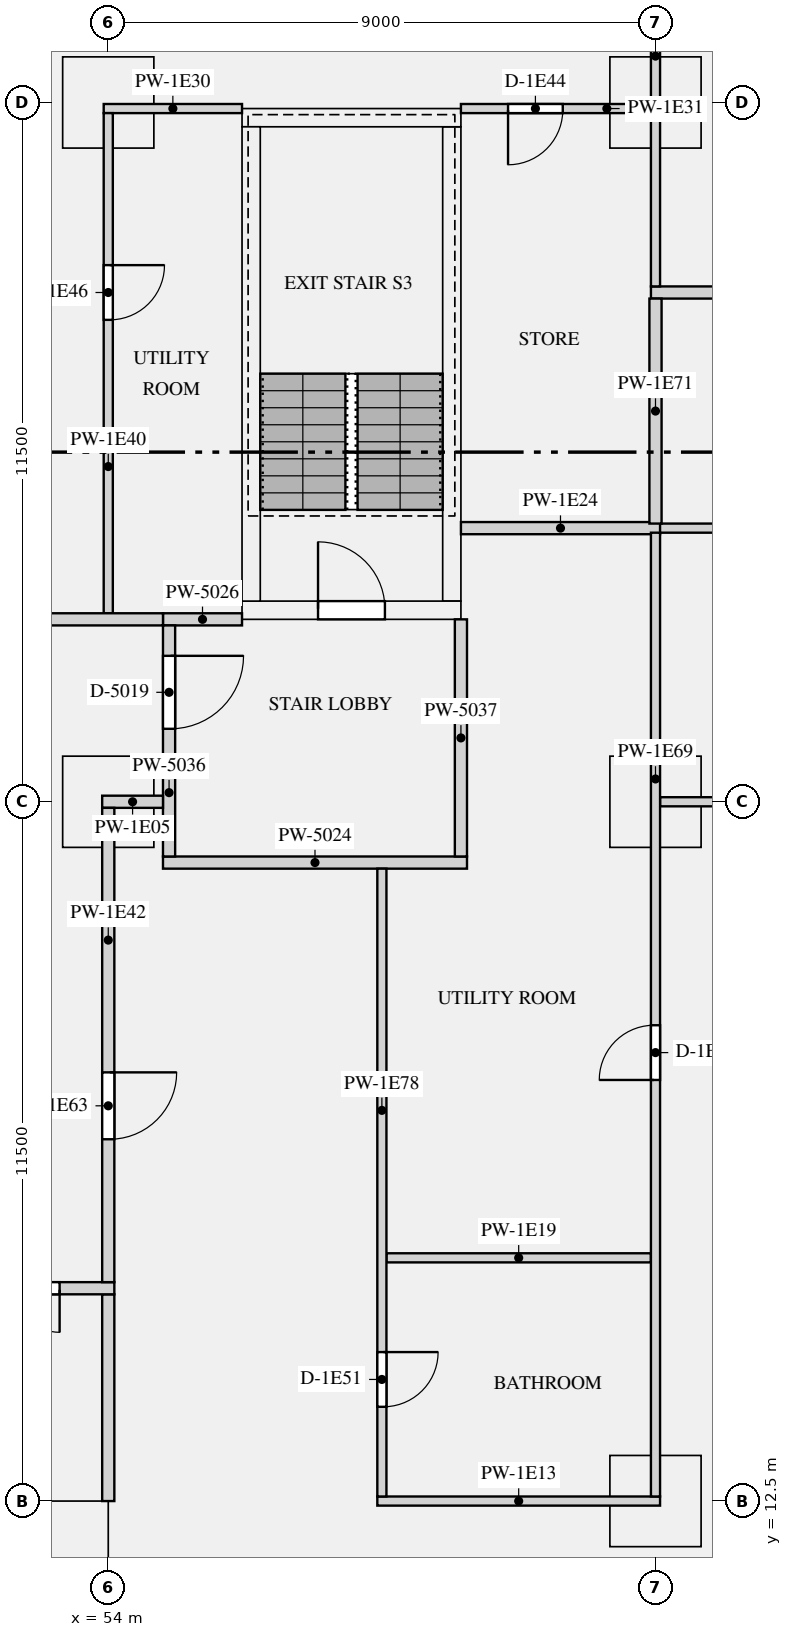
"""IFC4 building model, lengths in metres.
Left out: names, types, materials, properties, quantities, classifications, styles, units other than length and angle.
Written with IfcOpenShell. Run it as: python <this file> out.ifc"""

import sys

from ifc_helpers import new_model, si_unit, direction, frame, frame_2d, origin, origin_2d, place, context, subcontext, project, spatial, rectangle, extrude, element, fill, save


model = new_model("IFC4")
c1 = context("Model", 3, precision=1e-05, world=origin(), true_north=direction((0.0, 1.0)))
c2 = subcontext(c1, "Body", "Model", "MODEL_VIEW")
j1 = project(units=[si_unit("LENGTHUNIT", "METRE"), si_unit("PLANEANGLEUNIT", "RADIAN")], contexts=[c1])
p1 = place(None, origin())
s1 = spatial("IfcSite", under=j1, at=p1, CompositionType="ELEMENT")
p2 = place(p1, origin())
s2 = spatial("IfcBuilding", under=s1, at=p2, CompositionType="ELEMENT")
p3 = place(p2, frame((0.0, 0.0, 54.15)))
s3 = spatial("IfcBuildingStorey", under=s2, at=p3, CompositionType="ELEMENT", Elevation=54.15)
for number, where, z_axis, x_axis in (
    (1, (54.0, 24.0, 0.0), (0.0, 0.0, 1.0), (1.0, 0.0, 0.0)),
    (2, (63.0, 24.0, 0.0), (0.0, 0.0, 1.0), (1.0, 0.0, 0.0)),
    (3, (54.0, 35.5, 0.0), (0.0, 0.0, 1.0), (1.0, 0.0, 0.0)),
    (4, (63.0, 35.5, 0.0), (0.0, 0.0, 1.0), (1.0, 0.0, 0.0)),
    (5, (63.0, 12.5, 0.0), (0.0, 0.0, 1.0), (1.0, 0.0, 0.0)),
):
    element("IfcColumn", number, at=place(p3, frame(where, z_axis=z_axis, x_axis=x_axis)), inside=s3, PredefinedType="COLUMN", context=c2, shape_type="SweptSolid", body=[
        extrude(rectangle(XDim=1.5, YDim=1.5, at=origin_2d()), origin(), (0.0, 0.0, 1.0), 3.15),
    ])
p4 = place(p3, frame((53.5, 0.0, 0.0), z_axis=(0.0, 0.0, 1.0), x_axis=(0.0, 1.0, 0.0)))
e6 = element("IfcWall", 6, at=p4, inside=s3, PredefinedType="SHEAR", context=c2, shape_type="SweptSolid", body=[
    extrude(rectangle(XDim=12.5, YDim=1.0, at=frame_2d((6.25, 0.0))), origin(), (0.0, 0.0, 1.0), 3.15),
])
p5 = place(p3, frame((56.2, 27.15, 0.0), z_axis=(0.0, 0.0, 1.0), x_axis=(1.0, 0.0, 0.0)))
e7 = element("IfcWall", 7, at=p5, inside=s3, PredefinedType="SHEAR", context=c2, shape_type="SweptSolid", body=[
    extrude(rectangle(XDim=3.6, YDim=0.3, at=frame_2d((1.8, 0.0))), origin(), (0.0, 0.0, 1.0), 3.15),
])
p6 = place(p5, frame((1.25, 0.0, 0.0)))
e8 = element("IfcOpeningElement", 8, at=p6, cuts=e7, PredefinedType="OPENING", context=c2, shape_type="SweptSolid", body=[
    extrude(rectangle(XDim=1.1, YDim=2.1, at=frame_2d((0.55, 1.05))), frame((0.0, 0.16, 0.0), z_axis=(0.0, -1.0, 0.0), x_axis=(1.0, 0.0, 0.0)), (0.0, 0.0, 1.0), 0.32),
])
p7 = place(p3, frame((56.2, 35.25, 0.0), z_axis=(0.0, 0.0, 1.0), x_axis=(1.0, 0.0, 0.0)))
e9 = element("IfcWall", 9, at=p7, inside=s3, PredefinedType="SHEAR", context=c2, shape_type="SweptSolid", body=[
    extrude(rectangle(XDim=3.6, YDim=0.3, at=frame_2d((1.8, 0.0))), origin(), (0.0, 0.0, 1.0), 3.15),
])
for number, where, z_axis, x_axis in (
    (10, (56.35, 27.3, 0.0), (0.0, 0.0, 1.0), (0.0, 1.0, 0.0)),
    (11, (59.65, 27.3, 0.0), (0.0, 0.0, 1.0), (0.0, 1.0, 0.0)),
):
    element("IfcWall", number, at=place(p3, frame(where, z_axis=z_axis, x_axis=x_axis)), inside=s3, PredefinedType="SHEAR", context=c2, shape_type="SweptSolid", body=[
        extrude(rectangle(XDim=7.8, YDim=0.3, at=frame_2d((3.9, 0.0))), origin(), (0.0, 0.0, 1.0), 3.15),
    ])
p8 = place(p3, frame((54.9, 23.0, 0.0), z_axis=(0.0, 0.0, 1.0), x_axis=(1.0, 0.0, 0.0)))
e12 = element("IfcWall", 12, at=p8, inside=s3, PredefinedType="PARTITIONING", context=c2, shape_type="SweptSolid", body=[
    extrude(rectangle(XDim=5.0, YDim=0.2, at=frame_2d((2.5, 0.0))), origin(), (0.0, 0.0, 1.0), 2.83),
])
p9 = place(p3, frame((54.9, 27.0, 0.0), z_axis=(0.0, 0.0, 1.0), x_axis=(1.0, 0.0, 0.0)))
e13 = element("IfcWall", 13, at=p9, inside=s3, PredefinedType="PARTITIONING", context=c2, shape_type="SweptSolid", body=[
    extrude(rectangle(XDim=1.3, YDim=0.2, at=frame_2d((0.65, 0.0))), origin(), (0.0, 0.0, 1.0), 2.83),
])
p10 = place(p3, frame((54.0, 12.5, 0.0), z_axis=(0.0, 0.0, 1.0), x_axis=(0.0, 1.0, 0.0)))
e14 = element("IfcWall", 14, at=p10, inside=s3, PredefinedType="PARTITIONING", context=c2, shape_type="SweptSolid", body=[
    extrude(rectangle(XDim=3.4, YDim=0.2, at=frame_2d((1.7, 0.0))), origin(), (0.0, 0.0, 1.0), 2.83),
])
p11 = place(p3, frame((55.0, 23.1, 0.0), z_axis=(0.0, 0.0, 1.0), x_axis=(0.0, 1.0, 0.0)))
e15 = element("IfcWall", 15, at=p11, inside=s3, PredefinedType="PARTITIONING", context=c2, shape_type="SweptSolid", body=[
    extrude(rectangle(XDim=3.8, YDim=0.2, at=frame_2d((1.9, 0.0))), origin(), (0.0, 0.0, 1.0), 2.83),
])
p12 = place(p11, frame((2.1, 0.0, 0.0)))
e16 = element("IfcOpeningElement", 16, at=p12, cuts=e15, PredefinedType="OPENING", context=c2, shape_type="SweptSolid", body=[
    extrude(rectangle(XDim=1.2, YDim=2.1, at=frame_2d((0.6, 1.05))), frame((0.0, 0.11, 0.0), z_axis=(0.0, -1.0, 0.0), x_axis=(1.0, 0.0, 0.0)), (0.0, 0.0, 1.0), 0.22),
])
p13 = place(p3, frame((59.8, 23.1, 0.0), z_axis=(0.0, 0.0, 1.0), x_axis=(0.0, 1.0, 0.0)))
e17 = element("IfcWall", 17, at=p13, inside=s3, PredefinedType="PARTITIONING", context=c2, shape_type="SweptSolid", body=[
    extrude(rectangle(XDim=3.9, YDim=0.2, at=frame_2d((1.95, 0.0))), origin(), (0.0, 0.0, 1.0), 2.83),
])
p14 = place(p3, frame((63.075, 24.0, 0.0), z_axis=(0.0, 0.0, 1.0), x_axis=(1.0, 0.0, 0.0)))
e18 = element("IfcWall", 18, at=p14, inside=s3, PredefinedType="PARTITIONING", context=c2, shape_type="SweptSolid", body=[
    extrude(rectangle(XDim=10.125, YDim=0.15, at=frame_2d((5.062, 0.0))), origin(), (0.0, 0.0, 1.0), 2.83),
])
p15 = place(p14, frame((2.1, 0.0, 0.0)))
e19 = element("IfcOpeningElement", 19, at=p15, cuts=e18, PredefinedType="OPENING", context=c2, shape_type="SweptSolid", body=[
    extrude(rectangle(XDim=0.9, YDim=2.1, at=frame_2d((0.45, 1.05))), frame((0.0, 0.085, 0.0), z_axis=(0.0, -1.0, 0.0), x_axis=(1.0, 0.0, 0.0)), (0.0, 0.0, 1.0), 0.17),
])
p16 = place(p3, frame((53.9, 24.0, 0.0), z_axis=(0.0, 0.0, 1.0), x_axis=(1.0, 0.0, 0.0)))
e20 = element("IfcWall", 20, at=p16, inside=s3, PredefinedType="PARTITIONING", context=c2, shape_type="SweptSolid", body=[
    extrude(rectangle(XDim=1.0, YDim=0.2, at=frame_2d((0.5, 0.0))), origin(), (0.0, 0.0, 1.0), 2.83),
])
p17 = place(p3, frame((47.9, 27.0, 0.0), z_axis=(0.0, 0.0, 1.0), x_axis=(1.0, 0.0, 0.0)))
e21 = element("IfcWall", 21, at=p17, inside=s3, PredefinedType="PARTITIONING", context=c2, shape_type="SweptSolid", body=[
    extrude(rectangle(XDim=7.0, YDim=0.2, at=frame_2d((3.5, 0.0))), origin(), (0.0, 0.0, 1.0), 2.83),
])
p18 = place(p3, frame((58.425, 12.5, 0.0), z_axis=(0.0, 0.0, 1.0), x_axis=(1.0, 0.0, 0.0)))
e22 = element("IfcWall", 22, at=p18, inside=s3, PredefinedType="PARTITIONING", context=c2, shape_type="SweptSolid", body=[
    extrude(rectangle(XDim=4.65, YDim=0.15, at=frame_2d((2.325, 0.0))), origin(), (0.0, 0.0, 1.0), 2.83),
])
p19 = place(p3, frame((58.575, 16.5, 0.0), z_axis=(0.0, 0.0, 1.0), x_axis=(1.0, 0.0, 0.0)))
e23 = element("IfcWall", 23, at=p19, inside=s3, PredefinedType="PARTITIONING", context=c2, shape_type="SweptSolid", body=[
    extrude(rectangle(XDim=4.35, YDim=0.15, at=frame_2d((2.175, 0.0))), origin(), (0.0, 0.0, 1.0), 2.83),
])
p20 = place(p3, frame((62.925, 32.375, 0.0), z_axis=(0.0, 0.0, 1.0), x_axis=(1.0, 0.0, 0.0)))
e24 = element("IfcWall", 24, at=p20, inside=s3, PredefinedType="PARTITIONING", context=c2, shape_type="SweptSolid", body=[
    extrude(rectangle(XDim=12.775, YDim=0.2, at=frame_2d((6.387, 0.0))), origin(), (0.0, 0.0, 1.0), 2.83),
])
p21 = place(p3, frame((62.925, 28.5, 0.0), z_axis=(0.0, 0.0, 1.0), x_axis=(1.0, 0.0, 0.0)))
e25 = element("IfcWall", 25, at=p21, inside=s3, PredefinedType="PARTITIONING", context=c2, shape_type="SweptSolid", body=[
    extrude(rectangle(XDim=10.275, YDim=0.15, at=frame_2d((5.137, 0.0))), origin(), (0.0, 0.0, 1.0), 2.83),
])
p22 = place(p21, frame((4.5, 0.0, 0.0)))
e26 = element("IfcOpeningElement", 26, at=p22, cuts=e25, PredefinedType="OPENING", context=c2, shape_type="SweptSolid", body=[
    extrude(rectangle(XDim=1.5, YDim=2.1, at=frame_2d((0.75, 1.05))), frame((0.0, 0.085, 0.0), z_axis=(0.0, -1.0, 0.0), x_axis=(1.0, 0.0, 0.0)), (0.0, 0.0, 1.0), 0.17),
])
p23 = place(p3, frame((59.8, 28.5, 0.0), z_axis=(0.0, 0.0, 1.0), x_axis=(1.0, 0.0, 0.0)))
e27 = element("IfcWall", 27, at=p23, inside=s3, PredefinedType="PARTITIONING", context=c2, shape_type="SweptSolid", body=[
    extrude(rectangle(XDim=3.275, YDim=0.2, at=frame_2d((1.637, 0.0))), origin(), (0.0, 0.0, 1.0), 2.83),
])
p24 = place(p3, frame((53.925, 35.4, 0.0), z_axis=(0.0, 0.0, 1.0), x_axis=(1.0, 0.0, 0.0)))
e28 = element("IfcWall", 28, at=p24, inside=s3, PredefinedType="PARTITIONING", context=c2, shape_type="SweptSolid", body=[
    extrude(rectangle(XDim=2.275, YDim=0.15, at=frame_2d((1.137, 0.0))), origin(), (0.0, 0.0, 1.0), 2.83),
])
p25 = place(p3, frame((59.8, 35.4, 0.0), z_axis=(0.0, 0.0, 1.0), x_axis=(1.0, 0.0, 0.0)))
e29 = element("IfcWall", 29, at=p25, inside=s3, PredefinedType="PARTITIONING", context=c2, shape_type="SweptSolid", body=[
    extrude(rectangle(XDim=3.125, YDim=0.15, at=frame_2d((1.562, 0.0))), origin(), (0.0, 0.0, 1.0), 2.83),
])
p26 = place(p25, frame((0.775, 0.0, 0.0)))
e30 = element("IfcOpeningElement", 30, at=p26, cuts=e29, PredefinedType="OPENING", context=c2, shape_type="SweptSolid", body=[
    extrude(rectangle(XDim=0.9, YDim=2.1, at=frame_2d((0.45, 1.05))), frame((0.0, 0.085, 0.0), z_axis=(0.0, -1.0, 0.0), x_axis=(1.0, 0.0, 0.0)), (0.0, 0.0, 1.0), 0.17),
])
p27 = place(p3, frame((17.9, 16.0, 0.0), z_axis=(0.0, 0.0, 1.0), x_axis=(1.0, 0.0, 0.0)))
e31 = element("IfcWall", 31, at=p27, inside=s3, PredefinedType="PARTITIONING", context=c2, shape_type="SweptSolid", body=[
    extrude(rectangle(XDim=36.2, YDim=0.2, at=frame_2d((18.1, 0.0))), origin(), (0.0, 0.0, 1.0), 2.83),
])
p28 = place(p27, frame((0.9, 0.0, 0.0)))
e32 = element("IfcOpeningElement", 32, at=p28, cuts=e31, PredefinedType="OPENING", context=c2, shape_type="SweptSolid", body=[
    extrude(rectangle(XDim=1.4, YDim=2.1, at=frame_2d((0.7, 1.05))), frame((0.0, 0.11, 0.0), z_axis=(0.0, -1.0, 0.0), x_axis=(1.0, 0.0, 0.0)), (0.0, 0.0, 1.0), 0.22),
])
p29 = place(p27, frame((33.9, 0.0, 0.0)))
e33 = element("IfcOpeningElement", 33, at=p29, cuts=e31, PredefinedType="OPENING", context=c2, shape_type="SweptSolid", body=[
    extrude(rectangle(XDim=1.4, YDim=2.1, at=frame_2d((0.7, 1.05))), frame((0.0, 0.11, 0.0), z_axis=(0.0, -1.0, 0.0), x_axis=(1.0, 0.0, 0.0)), (0.0, 0.0, 1.0), 0.22),
])
p30 = place(p3, frame((54.0, 27.1, 0.0), z_axis=(0.0, 0.0, 1.0), x_axis=(0.0, 1.0, 0.0)))
e34 = element("IfcWall", 34, at=p30, inside=s3, PredefinedType="PARTITIONING", context=c2, shape_type="SweptSolid", body=[
    extrude(rectangle(XDim=8.225, YDim=0.15, at=frame_2d((4.112, 0.0))), origin(), (0.0, 0.0, 1.0), 2.83),
])
p31 = place(p30, frame((4.825, 0.0, 0.0)))
e35 = element("IfcOpeningElement", 35, at=p31, cuts=e34, PredefinedType="OPENING", context=c2, shape_type="SweptSolid", body=[
    extrude(rectangle(XDim=0.9, YDim=2.1, at=frame_2d((0.45, 1.05))), frame((0.0, 0.085, 0.0), z_axis=(0.0, -1.0, 0.0), x_axis=(1.0, 0.0, 0.0)), (0.0, 0.0, 1.0), 0.17),
])
p32 = place(p3, frame((54.0, 16.1, 0.0), z_axis=(0.0, 0.0, 1.0), x_axis=(0.0, 1.0, 0.0)))
e36 = element("IfcWall", 36, at=p32, inside=s3, PredefinedType="PARTITIONING", context=c2, shape_type="SweptSolid", body=[
    extrude(rectangle(XDim=7.8, YDim=0.2, at=frame_2d((3.9, 0.0))), origin(), (0.0, 0.0, 1.0), 2.83),
])
p33 = place(p32, frame((2.35, 0.0, 0.0)))
e37 = element("IfcOpeningElement", 37, at=p33, cuts=e36, PredefinedType="OPENING", context=c2, shape_type="SweptSolid", body=[
    extrude(rectangle(XDim=1.1, YDim=2.1, at=frame_2d((0.55, 1.05))), frame((0.0, 0.11, 0.0), z_axis=(0.0, -1.0, 0.0), x_axis=(1.0, 0.0, 0.0)), (0.0, 0.0, 1.0), 0.22),
])
p34 = place(p3, frame((63.0, 12.575, 0.0), z_axis=(0.0, 0.0, 1.0), x_axis=(0.0, 1.0, 0.0)))
e38 = element("IfcWall", 38, at=p34, inside=s3, PredefinedType="PARTITIONING", context=c2, shape_type="SweptSolid", body=[
    extrude(rectangle(XDim=15.85, YDim=0.15, at=frame_2d((7.925, 0.0))), origin(), (0.0, 0.0, 1.0), 2.83),
])
p35 = place(p34, frame((6.85, 0.0, 0.0)))
e39 = element("IfcOpeningElement", 39, at=p35, cuts=e38, PredefinedType="OPENING", context=c2, shape_type="SweptSolid", body=[
    extrude(rectangle(XDim=0.9, YDim=2.1, at=frame_2d((0.45, 1.05))), frame((0.0, 0.085, 0.0), z_axis=(0.0, -1.0, 0.0), x_axis=(1.0, 0.0, 0.0)), (0.0, 0.0, 1.0), 0.17),
])
p36 = place(p3, frame((63.0, 32.475, 0.0), z_axis=(0.0, 0.0, 1.0), x_axis=(0.0, 1.0, 0.0)))
e40 = element("IfcWall", 40, at=p36, inside=s3, PredefinedType="PARTITIONING", context=c2, shape_type="SweptSolid", body=[
    extrude(rectangle(XDim=7.575, YDim=0.15, at=frame_2d((3.788, 0.0))), origin(), (0.0, 0.0, 1.0), 2.83),
])
p37 = place(p3, frame((63.0, 28.575, 0.0), z_axis=(0.0, 0.0, 1.0), x_axis=(0.0, 1.0, 0.0)))
e41 = element("IfcWall", 41, at=p37, inside=s3, PredefinedType="PARTITIONING", context=c2, shape_type="SweptSolid", body=[
    extrude(rectangle(XDim=3.7, YDim=0.2, at=frame_2d((1.85, 0.0))), origin(), (0.0, 0.0, 1.0), 2.83),
])
p38 = place(p3, frame((58.5, 12.575, 0.0), z_axis=(0.0, 0.0, 1.0), x_axis=(0.0, 1.0, 0.0)))
e42 = element("IfcWall", 42, at=p38, inside=s3, PredefinedType="PARTITIONING", context=c2, shape_type="SweptSolid", body=[
    extrude(rectangle(XDim=10.325, YDim=0.15, at=frame_2d((5.163, 0.0))), origin(), (0.0, 0.0, 1.0), 2.83),
])
p39 = place(p38, frame((1.475, 0.0, 0.0)))
e43 = element("IfcOpeningElement", 43, at=p39, cuts=e42, PredefinedType="OPENING", context=c2, shape_type="SweptSolid", body=[
    extrude(rectangle(XDim=0.9, YDim=2.1, at=frame_2d((0.45, 1.05))), frame((0.0, 0.085, 0.0), z_axis=(0.0, -1.0, 0.0), x_axis=(1.0, 0.0, 0.0)), (0.0, 0.0, 1.0), 0.17),
])
p40 = place(p6, origin())
e44 = element("IfcDoor", 44, at=p40, inside=s3, OperationType="SINGLE_SWING_LEFT", PredefinedType="DOOR", context=c2, shape_type="SweptSolid", body=[
    extrude(rectangle(XDim=1.1, YDim=2.1, at=frame_2d((0.55, 1.05))), frame((0.0, 0.025, 0.0), z_axis=(0.0, -1.0, 0.0), x_axis=(1.0, 0.0, 0.0)), (0.0, 0.0, 1.0), 0.05),
])
fill(e8, e44)
p41 = place(p12, frame((1.2, 0.0, 0.0), z_axis=(0.0, 0.0, 1.0), x_axis=(-1.0, 0.0, 0.0)))
e45 = element("IfcDoor", 45, at=p41, inside=s3, OperationType="SINGLE_SWING_LEFT", PredefinedType="DOOR", context=c2, shape_type="SweptSolid", body=[
    extrude(rectangle(XDim=1.2, YDim=2.1, at=frame_2d((0.6, 1.05))), frame((0.0, 0.025, 0.0), z_axis=(0.0, -1.0, 0.0), x_axis=(1.0, 0.0, 0.0)), (0.0, 0.0, 1.0), 0.05),
])
fill(e16, e45)
p42 = place(p29, frame((1.4, 0.0, 0.0), z_axis=(0.0, 0.0, 1.0), x_axis=(-1.0, 0.0, 0.0)))
e46 = element("IfcDoor", 46, at=p42, inside=s3, OperationType="DOUBLE_DOOR_SINGLE_SWING", PredefinedType="DOOR", context=c2, shape_type="SweptSolid", body=[
    extrude(rectangle(XDim=1.4, YDim=2.1, at=frame_2d((0.7, 1.05))), frame((0.0, 0.025, 0.0), z_axis=(0.0, -1.0, 0.0), x_axis=(1.0, 0.0, 0.0)), (0.0, 0.0, 1.0), 0.05),
])
fill(e33, e46)
p43 = place(p26, frame((0.9, 0.0, 0.0), z_axis=(0.0, 0.0, 1.0), x_axis=(-1.0, 0.0, 0.0)))
e47 = element("IfcDoor", 47, at=p43, inside=s3, OperationType="SINGLE_SWING_RIGHT", PredefinedType="DOOR", context=c2, shape_type="SweptSolid", body=[
    extrude(rectangle(XDim=0.9, YDim=2.1, at=frame_2d((0.45, 1.05))), frame((0.0, 0.025, 0.0), z_axis=(0.0, -1.0, 0.0), x_axis=(1.0, 0.0, 0.0)), (0.0, 0.0, 1.0), 0.05),
])
fill(e30, e47)
p44 = place(p31, frame((0.9, 0.0, 0.0), z_axis=(0.0, 0.0, 1.0), x_axis=(-1.0, 0.0, 0.0)))
e48 = element("IfcDoor", 48, at=p44, inside=s3, OperationType="SINGLE_SWING_LEFT", PredefinedType="DOOR", context=c2, shape_type="SweptSolid", body=[
    extrude(rectangle(XDim=0.9, YDim=2.1, at=frame_2d((0.45, 1.05))), frame((0.0, 0.025, 0.0), z_axis=(0.0, -1.0, 0.0), x_axis=(1.0, 0.0, 0.0)), (0.0, 0.0, 1.0), 0.05),
])
fill(e35, e48)
p45 = place(p39, frame((0.9, 0.0, 0.0), z_axis=(0.0, 0.0, 1.0), x_axis=(-1.0, 0.0, 0.0)))
e49 = element("IfcDoor", 49, at=p45, inside=s3, OperationType="SINGLE_SWING_LEFT", PredefinedType="DOOR", context=c2, shape_type="SweptSolid", body=[
    extrude(rectangle(XDim=0.9, YDim=2.1, at=frame_2d((0.45, 1.05))), frame((0.0, 0.025, 0.0), z_axis=(0.0, -1.0, 0.0), x_axis=(1.0, 0.0, 0.0)), (0.0, 0.0, 1.0), 0.05),
])
fill(e43, e49)
p46 = place(p35, origin())
e50 = element("IfcDoor", 50, at=p46, inside=s3, OperationType="SINGLE_SWING_LEFT", PredefinedType="DOOR", context=c2, shape_type="SweptSolid", body=[
    extrude(rectangle(XDim=0.9, YDim=2.1, at=frame_2d((0.45, 1.05))), frame((0.0, 0.025, 0.0), z_axis=(0.0, -1.0, 0.0), x_axis=(1.0, 0.0, 0.0)), (0.0, 0.0, 1.0), 0.05),
])
fill(e39, e50)
p47 = place(p33, frame((1.1, 0.0, 0.0), z_axis=(0.0, 0.0, 1.0), x_axis=(-1.0, 0.0, 0.0)))
e51 = element("IfcDoor", 51, at=p47, inside=s3, OperationType="SINGLE_SWING_LEFT", PredefinedType="DOOR", context=c2, shape_type="SweptSolid", body=[
    extrude(rectangle(XDim=1.1, YDim=2.1, at=frame_2d((0.55, 1.05))), frame((0.0, 0.025, 0.0), z_axis=(0.0, -1.0, 0.0), x_axis=(1.0, 0.0, 0.0)), (0.0, 0.0, 1.0), 0.05),
])
fill(e37, e51)
save(model, sys.argv[1])
